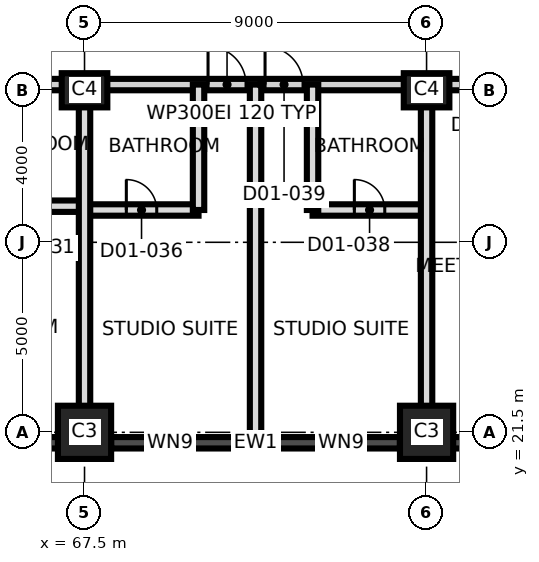
"""IFC4 building model, lengths in metres.
Left out: names, types, materials, properties, quantities, classifications, styles, units other than length and angle.
Written with IfcOpenShell. Run it as: python <this file> out.ifc"""

import sys

from ifc_helpers import new_model, si_unit, direction, frame, frame_2d, origin, origin_2d, place, context, subcontext, project, spatial, rectangle, extrude, element, fill, save


model = new_model("IFC4")
c1 = context("Model", 3, precision=1e-05, world=origin(), true_north=direction((0.0, 1.0)))
c2 = subcontext(c1, "Body", "Model", "MODEL_VIEW")
j1 = project(units=[si_unit("LENGTHUNIT", "METRE"), si_unit("PLANEANGLEUNIT", "RADIAN")], contexts=[c1])
p1 = place(None, origin())
s1 = spatial("IfcSite", under=j1, at=p1, CompositionType="ELEMENT")
p2 = place(p1, origin())
s2 = spatial("IfcBuilding", under=s1, at=p2, CompositionType="ELEMENT")
p3 = place(p2, frame((0.0, 0.0, 33.5)))
s3 = spatial("IfcBuildingStorey", under=s2, at=p3, CompositionType="ELEMENT", Elevation=33.5)
for number, where, z_axis, x_axis in (
    (1, (67.5, 21.5, 0.0), (0.0, 0.0, 1.0), (1.0, 0.0, 0.0)),
    (2, (76.5, 21.5, 0.0), (0.0, 0.0, 1.0), (1.0, 0.0, 0.0)),
):
    element("IfcColumn", number, at=place(p3, frame(where, z_axis=z_axis, x_axis=x_axis)), inside=s3, PredefinedType="COLUMN", context=c2, shape_type="SweptSolid", body=[
        extrude(rectangle(XDim=1.4, YDim=1.4, at=origin_2d()), origin(), (0.0, 0.0, 1.0), 3.7),
    ])
for number, where, z_axis, x_axis in (
    (3, (67.5, 30.5, 0.0), (0.0, 0.0, 1.0), (1.0, 0.0, 0.0)),
    (4, (76.5, 30.5, 0.0), (0.0, 0.0, 1.0), (1.0, 0.0, 0.0)),
):
    element("IfcColumn", number, at=place(p3, frame(where, z_axis=z_axis, x_axis=x_axis)), inside=s3, PredefinedType="COLUMN", context=c2, shape_type="SweptSolid", body=[
        extrude(rectangle(XDim=1.2, YDim=0.9, at=origin_2d()), origin(), (0.0, 0.0, 1.0), 3.7),
    ])
p4 = place(p3, frame((59.207, 21.225, 0.0), z_axis=(0.0, 0.0, 1.0), x_axis=(1.0, 0.0, 0.0)))
e5 = element("IfcWall", 5, at=p4, inside=s3, PredefinedType="SOLIDWALL", context=c2, shape_type="SweptSolid", body=[
    extrude(rectangle(XDim=8.993, YDim=0.3, at=frame_2d((4.497, 0.0))), origin(), (0.0, 0.0, 1.0), 3.4),
])
p5 = place(p4, frame((0.997, 0.0, 0.3)))
e6 = element("IfcOpeningElement", 6, at=p5, cuts=e5, PredefinedType="OPENING", context=c2, shape_type="SweptSolid", body=[
    extrude(rectangle(XDim=1.8, YDim=2.4, at=frame_2d((0.9, 1.2))), frame((0.0, 0.16, 0.0), z_axis=(0.0, -1.0, 0.0), x_axis=(1.0, 0.0, 0.0)), (0.0, 0.0, 1.0), 0.32),
])
p6 = place(p4, frame((5.443, 0.0, 0.9)))
e7 = element("IfcOpeningElement", 7, at=p6, cuts=e5, PredefinedType="OPENING", context=c2, shape_type="SweptSolid", body=[
    extrude(rectangle(XDim=1.2, YDim=1.5, at=frame_2d((0.6, 0.75))), frame((0.0, 0.16, 0.0), z_axis=(0.0, -1.0, 0.0), x_axis=(1.0, 0.0, 0.0)), (0.0, 0.0, 1.0), 0.32),
])
p7 = place(p3, frame((68.2, 21.225, 0.0), z_axis=(0.0, 0.0, 1.0), x_axis=(1.0, 0.0, 0.0)))
e8 = element("IfcWall", 8, at=p7, inside=s3, PredefinedType="SOLIDWALL", context=c2, shape_type="SweptSolid", body=[
    extrude(rectangle(XDim=7.6, YDim=0.3, at=frame_2d((3.8, 0.0))), origin(), (0.0, 0.0, 1.0), 2.7),
])
p8 = place(p7, frame((0.95, 0.0, 0.9)))
e9 = element("IfcOpeningElement", 9, at=p8, cuts=e8, PredefinedType="OPENING", context=c2, shape_type="SweptSolid", body=[
    extrude(rectangle(XDim=1.2, YDim=1.5, at=frame_2d((0.6, 0.75))), frame((0.0, 0.16, 0.0), z_axis=(0.0, -1.0, 0.0), x_axis=(1.0, 0.0, 0.0)), (0.0, 0.0, 1.0), 0.32),
])
p9 = place(p7, frame((5.45, 0.0, 0.9)))
e10 = element("IfcOpeningElement", 10, at=p9, cuts=e8, PredefinedType="OPENING", context=c2, shape_type="SweptSolid", body=[
    extrude(rectangle(XDim=1.2, YDim=1.5, at=frame_2d((0.6, 0.75))), frame((0.0, 0.16, 0.0), z_axis=(0.0, -1.0, 0.0), x_axis=(1.0, 0.0, 0.0)), (0.0, 0.0, 1.0), 0.32),
])
p10 = place(p3, frame((75.8, 21.225, 0.0), z_axis=(0.0, 0.0, 1.0), x_axis=(1.0, 0.0, 0.0)))
e11 = element("IfcWall", 11, at=p10, inside=s3, PredefinedType="SOLIDWALL", context=c2, shape_type="SweptSolid", body=[
    extrude(rectangle(XDim=11.684, YDim=0.3, at=frame_2d((5.842, 0.0))), origin(), (0.0, 0.0, 1.0), 3.4),
])
p11 = place(p10, frame((2.35, 0.0, 0.9)))
e12 = element("IfcOpeningElement", 12, at=p11, cuts=e11, PredefinedType="OPENING", context=c2, shape_type="SweptSolid", body=[
    extrude(rectangle(XDim=1.2, YDim=1.5, at=frame_2d((0.6, 0.75))), frame((0.0, 0.16, 0.0), z_axis=(0.0, -1.0, 0.0), x_axis=(1.0, 0.0, 0.0)), (0.0, 0.0, 1.0), 0.32),
])
p12 = place(p10, frame((6.85, 0.0, 0.9)))
e13 = element("IfcOpeningElement", 13, at=p12, cuts=e11, PredefinedType="OPENING", context=c2, shape_type="SweptSolid", body=[
    extrude(rectangle(XDim=1.2, YDim=1.5, at=frame_2d((0.6, 0.75))), frame((0.0, 0.16, 0.0), z_axis=(0.0, -1.0, 0.0), x_axis=(1.0, 0.0, 0.0)), (0.0, 0.0, 1.0), 0.32),
])
p13 = place(p3, frame((67.5, 27.35, 0.0), z_axis=(0.0, 0.0, 1.0), x_axis=(1.0, 0.0, 0.0)))
e14 = element("IfcWall", 14, at=p13, inside=s3, PredefinedType="PARTITIONING", context=c2, shape_type="SweptSolid", body=[
    extrude(rectangle(XDim=3.0, YDim=0.3, at=frame_2d((1.5, 0.0))), origin(), (0.0, 0.0, 1.0), 3.4),
])
p14 = place(p13, frame((1.1, 0.0, 0.0)))
e15 = element("IfcOpeningElement", 15, at=p14, cuts=e14, PredefinedType="OPENING", context=c2, shape_type="SweptSolid", body=[
    extrude(rectangle(XDim=0.8, YDim=2.1, at=frame_2d((0.4, 1.05))), frame((0.0, 0.16, 0.0), z_axis=(0.0, -1.0, 0.0), x_axis=(1.0, 0.0, 0.0)), (0.0, 0.0, 1.0), 0.32),
])
p15 = place(p3, frame((73.5, 27.35, 0.0), z_axis=(0.0, 0.0, 1.0), x_axis=(1.0, 0.0, 0.0)))
e16 = element("IfcWall", 16, at=p15, inside=s3, PredefinedType="PARTITIONING", context=c2, shape_type="SweptSolid", body=[
    extrude(rectangle(XDim=3.0, YDim=0.3, at=frame_2d((1.5, 0.0))), origin(), (0.0, 0.0, 1.0), 3.4),
])
p16 = place(p15, frame((1.1, 0.0, 0.0)))
e17 = element("IfcOpeningElement", 17, at=p16, cuts=e16, PredefinedType="OPENING", context=c2, shape_type="SweptSolid", body=[
    extrude(rectangle(XDim=0.8, YDim=2.1, at=frame_2d((0.4, 1.05))), frame((0.0, 0.16, 0.0), z_axis=(0.0, -1.0, 0.0), x_axis=(1.0, 0.0, 0.0)), (0.0, 0.0, 1.0), 0.32),
])
p17 = place(p3, frame((64.8, 27.45, 0.0), z_axis=(0.0, 0.0, 1.0), x_axis=(1.0, 0.0, 0.0)))
e18 = element("IfcWall", 18, at=p17, inside=s3, PredefinedType="PARTITIONING", context=c2, shape_type="SweptSolid", body=[
    extrude(rectangle(XDim=2.7, YDim=0.3, at=frame_2d((1.35, 0.0))), origin(), (0.0, 0.0, 1.0), 3.4),
])
p18 = place(p17, frame((0.95, 0.0, 0.0)))
e19 = element("IfcOpeningElement", 19, at=p18, cuts=e18, PredefinedType="OPENING", context=c2, shape_type="SweptSolid", body=[
    extrude(rectangle(XDim=0.8, YDim=2.1, at=frame_2d((0.4, 1.05))), frame((0.0, 0.16, 0.0), z_axis=(0.0, -1.0, 0.0), x_axis=(1.0, 0.0, 0.0)), (0.0, 0.0, 1.0), 0.32),
])
p19 = place(p3, frame((58.95, 30.65, 0.0), z_axis=(0.0, 0.0, 1.0), x_axis=(1.0, 0.0, 0.0)))
e20 = element("IfcWall", 20, at=p19, inside=s3, PredefinedType="PARTITIONING", context=c2, shape_type="SweptSolid", body=[
    extrude(rectangle(XDim=26.38, YDim=0.3, at=frame_2d((13.19, 0.0))), origin(), (0.0, 0.0, 1.0), 3.4),
])
p20 = place(p19, frame((2.47, 0.0, 0.0)))
e21 = element("IfcOpeningElement", 21, at=p20, cuts=e20, PredefinedType="OPENING", context=c2, shape_type="SweptSolid", body=[
    extrude(rectangle(XDim=1.0, YDim=2.1, at=frame_2d((0.5, 1.05))), frame((0.0, 0.16, 0.0), z_axis=(0.0, -1.0, 0.0), x_axis=(1.0, 0.0, 0.0)), (0.0, 0.0, 1.0), 0.32),
])
p21 = place(p19, frame((4.27, 0.0, 0.0)))
e22 = element("IfcOpeningElement", 22, at=p21, cuts=e20, PredefinedType="OPENING", context=c2, shape_type="SweptSolid", body=[
    extrude(rectangle(XDim=1.0, YDim=2.1, at=frame_2d((0.5, 1.05))), frame((0.0, 0.16, 0.0), z_axis=(0.0, -1.0, 0.0), x_axis=(1.0, 0.0, 0.0)), (0.0, 0.0, 1.0), 0.32),
])
p22 = place(p19, frame((11.8, 0.0, 0.0)))
e23 = element("IfcOpeningElement", 23, at=p22, cuts=e20, PredefinedType="OPENING", context=c2, shape_type="SweptSolid", body=[
    extrude(rectangle(XDim=1.0, YDim=2.4, at=frame_2d((0.5, 1.2))), frame((0.0, 0.16, 0.0), z_axis=(0.0, -1.0, 0.0), x_axis=(1.0, 0.0, 0.0)), (0.0, 0.0, 1.0), 0.32),
])
p23 = place(p19, frame((13.3, 0.0, 0.0)))
e24 = element("IfcOpeningElement", 24, at=p23, cuts=e20, PredefinedType="OPENING", context=c2, shape_type="SweptSolid", body=[
    extrude(rectangle(XDim=1.0, YDim=2.4, at=frame_2d((0.5, 1.2))), frame((0.0, 0.16, 0.0), z_axis=(0.0, -1.0, 0.0), x_axis=(1.0, 0.0, 0.0)), (0.0, 0.0, 1.0), 0.32),
])
p24 = place(p19, frame((18.685, 0.0, 0.0)))
e25 = element("IfcOpeningElement", 25, at=p24, cuts=e20, PredefinedType="OPENING", context=c2, shape_type="SweptSolid", body=[
    extrude(rectangle(XDim=1.2, YDim=2.1, at=frame_2d((0.6, 1.05))), frame((0.0, 0.16, 0.0), z_axis=(0.0, -1.0, 0.0), x_axis=(1.0, 0.0, 0.0)), (0.0, 0.0, 1.0), 0.32),
])
p25 = place(p19, frame((21.935, 0.0, 0.0)))
e26 = element("IfcOpeningElement", 26, at=p25, cuts=e20, PredefinedType="OPENING", context=c2, shape_type="SweptSolid", body=[
    extrude(rectangle(XDim=1.0, YDim=2.1, at=frame_2d((0.5, 1.05))), frame((0.0, 0.16, 0.0), z_axis=(0.0, -1.0, 0.0), x_axis=(1.0, 0.0, 0.0)), (0.0, 0.0, 1.0), 0.32),
])
p26 = place(p3, frame((67.5, 21.425, 0.0), z_axis=(0.0, 0.0, 1.0), x_axis=(0.0, 1.0, 0.0)))
e27 = element("IfcWall", 27, at=p26, inside=s3, PredefinedType="PARTITIONING", context=c2, shape_type="SweptSolid", body=[
    extrude(rectangle(XDim=9.225, YDim=0.3, at=frame_2d((4.612, 0.0))), origin(), (0.0, 0.0, 1.0), 3.4),
])
p27 = place(p3, frame((70.5, 27.35, 0.0), z_axis=(0.0, 0.0, 1.0), x_axis=(0.0, 1.0, 0.0)))
e28 = element("IfcWall", 28, at=p27, inside=s3, PredefinedType="PARTITIONING", context=c2, shape_type="SweptSolid", body=[
    extrude(rectangle(XDim=3.3, YDim=0.3, at=frame_2d((1.65, 0.0))), origin(), (0.0, 0.0, 1.0), 3.4),
])
p28 = place(p3, frame((72.0, 21.425, 0.0), z_axis=(0.0, 0.0, 1.0), x_axis=(0.0, 1.0, 0.0)))
e29 = element("IfcWall", 29, at=p28, inside=s3, PredefinedType="PARTITIONING", context=c2, shape_type="SweptSolid", body=[
    extrude(rectangle(XDim=9.225, YDim=0.3, at=frame_2d((4.612, 0.0))), origin(), (0.0, 0.0, 1.0), 3.4),
])
p29 = place(p3, frame((73.5, 27.35, 0.0), z_axis=(0.0, 0.0, 1.0), x_axis=(0.0, 1.0, 0.0)))
e30 = element("IfcWall", 30, at=p29, inside=s3, PredefinedType="PARTITIONING", context=c2, shape_type="SweptSolid", body=[
    extrude(rectangle(XDim=3.3, YDim=0.3, at=frame_2d((1.65, 0.0))), origin(), (0.0, 0.0, 1.0), 3.4),
])
p30 = place(p3, frame((76.5, 21.425, 0.0), z_axis=(0.0, 0.0, 1.0), x_axis=(0.0, 1.0, 0.0)))
e31 = element("IfcWall", 31, at=p30, inside=s3, PredefinedType="PARTITIONING", context=c2, shape_type="SweptSolid", body=[
    extrude(rectangle(XDim=9.225, YDim=0.3, at=frame_2d((4.612, 0.0))), origin(), (0.0, 0.0, 1.0), 3.4),
])
p31 = place(p8, origin())
e32 = element("IfcWindow", 32, at=p31, inside=s3, PartitioningType="SINGLE_PANEL", PredefinedType="WINDOW", context=c2, shape_type="SweptSolid", body=[
    extrude(rectangle(XDim=1.2, YDim=1.5, at=frame_2d((0.6, 0.75))), frame((0.0, 0.03, 0.0), z_axis=(0.0, -1.0, 0.0), x_axis=(1.0, 0.0, 0.0)), (0.0, 0.0, 1.0), 0.06),
])
fill(e9, e32)
p32 = place(p9, origin())
e33 = element("IfcWindow", 33, at=p32, inside=s3, PartitioningType="SINGLE_PANEL", PredefinedType="WINDOW", context=c2, shape_type="SweptSolid", body=[
    extrude(rectangle(XDim=1.2, YDim=1.5, at=frame_2d((0.6, 0.75))), frame((0.0, 0.03, 0.0), z_axis=(0.0, -1.0, 0.0), x_axis=(1.0, 0.0, 0.0)), (0.0, 0.0, 1.0), 0.06),
])
fill(e10, e33)
p33 = place(p14, origin())
e34 = element("IfcDoor", 34, at=p33, inside=s3, OperationType="SINGLE_SWING_LEFT", PredefinedType="DOOR", context=c2, shape_type="SweptSolid", body=[
    extrude(rectangle(XDim=0.8, YDim=2.1, at=frame_2d((0.4, 1.05))), frame((0.0, 0.025, 0.0), z_axis=(0.0, -1.0, 0.0), x_axis=(1.0, 0.0, 0.0)), (0.0, 0.0, 1.0), 0.05),
])
fill(e15, e34)
p34 = place(p22, origin())
e35 = element("IfcDoor", 35, at=p34, inside=s3, OperationType="SINGLE_SWING_LEFT", PredefinedType="DOOR", context=c2, shape_type="SweptSolid", body=[
    extrude(rectangle(XDim=1.0, YDim=2.4, at=frame_2d((0.5, 1.2))), frame((0.0, 0.025, 0.0), z_axis=(0.0, -1.0, 0.0), x_axis=(1.0, 0.0, 0.0)), (0.0, 0.0, 1.0), 0.05),
])
fill(e23, e35)
p35 = place(p16, origin())
e36 = element("IfcDoor", 36, at=p35, inside=s3, OperationType="SINGLE_SWING_LEFT", PredefinedType="DOOR", context=c2, shape_type="SweptSolid", body=[
    extrude(rectangle(XDim=0.8, YDim=2.1, at=frame_2d((0.4, 1.05))), frame((0.0, 0.025, 0.0), z_axis=(0.0, -1.0, 0.0), x_axis=(1.0, 0.0, 0.0)), (0.0, 0.0, 1.0), 0.05),
])
fill(e17, e36)
p36 = place(p23, origin())
e37 = element("IfcDoor", 37, at=p36, inside=s3, OperationType="SINGLE_SWING_RIGHT", PredefinedType="DOOR", context=c2, shape_type="SweptSolid", body=[
    extrude(rectangle(XDim=1.0, YDim=2.4, at=frame_2d((0.5, 1.2))), frame((0.0, 0.025, 0.0), z_axis=(0.0, -1.0, 0.0), x_axis=(1.0, 0.0, 0.0)), (0.0, 0.0, 1.0), 0.05),
])
fill(e24, e37)
save(model, sys.argv[1])
